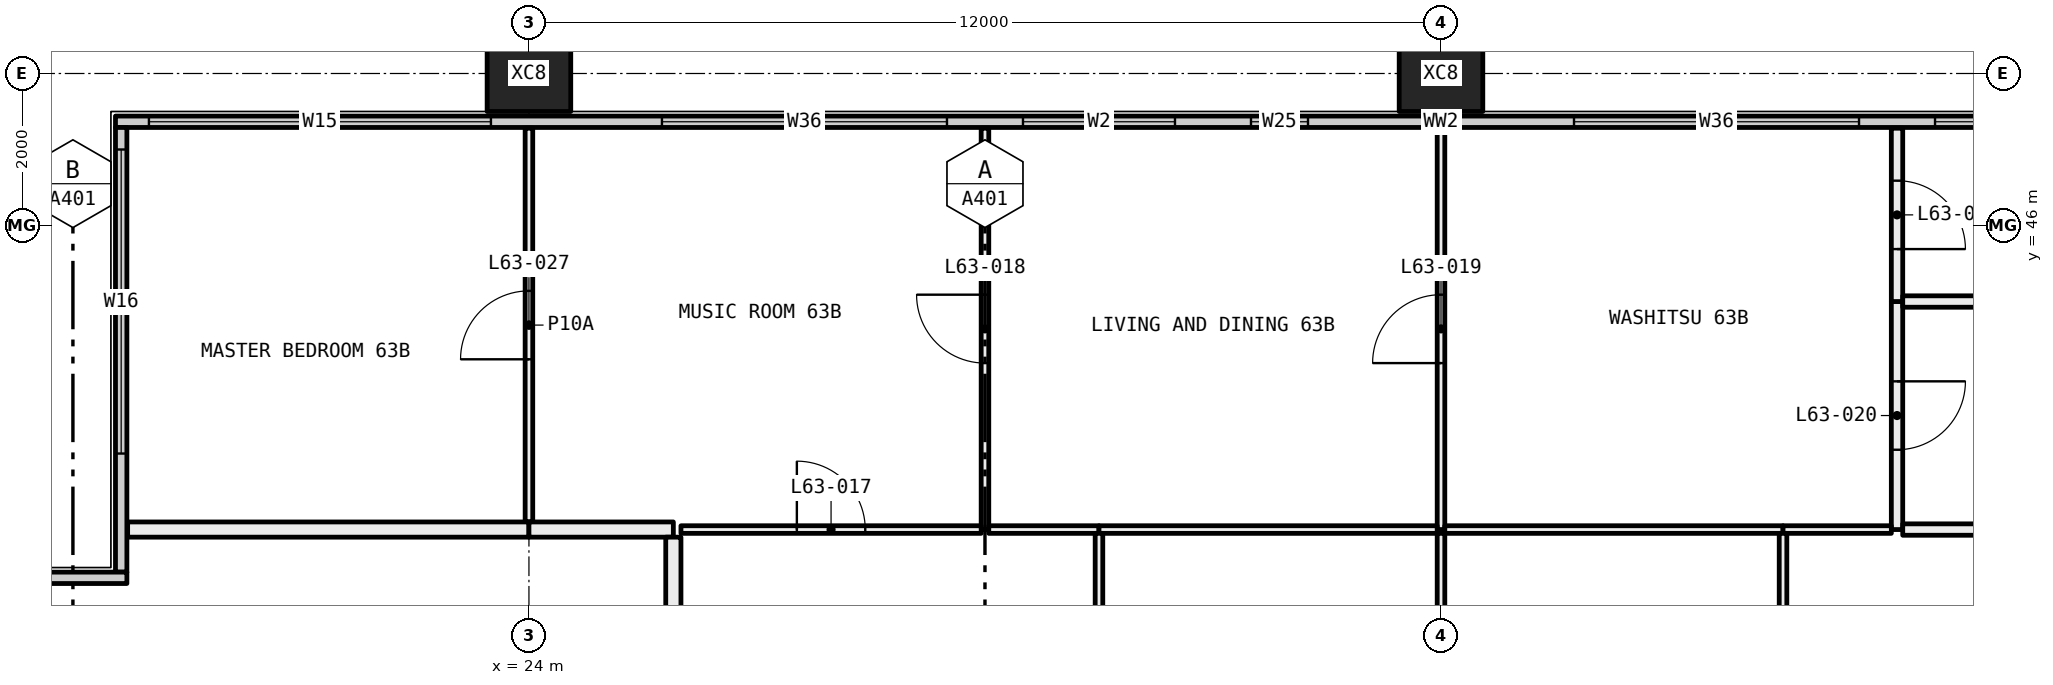
"""IFC4 building model, lengths in metres.
Left out: names, types, materials, properties, quantities, classifications, styles, units other than length and angle.
Written with IfcOpenShell. Run it as: python <this file> out.ifc"""

import sys

from ifc_helpers import new_model, si_unit, direction, frame, frame_2d, origin, origin_2d, place, context, subcontext, project, spatial, rectangle, hollow_rectangle, extrude, element, fill, save


model = new_model("IFC4")
c1 = context("Model", 3, precision=1e-05, world=origin(), true_north=direction((0.0, 1.0)))
c2 = subcontext(c1, "Body", "Model", "MODEL_VIEW")
j1 = project(units=[si_unit("LENGTHUNIT", "METRE"), si_unit("PLANEANGLEUNIT", "RADIAN")], contexts=[c1])
p1 = place(None, origin())
s1 = spatial("IfcSite", under=j1, at=p1, CompositionType="ELEMENT")
p2 = place(p1, origin())
s2 = spatial("IfcBuilding", under=s1, at=p2, CompositionType="ELEMENT")
p3 = place(p2, frame((0.0, 0.0, 235.2)))
s3 = spatial("IfcBuildingStorey", under=s2, at=p3, CompositionType="ELEMENT", Elevation=235.2)
for number, where, z_axis, x_axis in (
    (1, (24.0, 48.0, -0.4), (0.0, 0.0, 1.0), (1.0, 0.0, 0.0)),
    (2, (36.0, 48.0, -0.4), (0.0, 0.0, 1.0), (1.0, 0.0, 0.0)),
):
    element("IfcColumn", number, at=place(p3, frame(where, z_axis=z_axis, x_axis=x_axis)), inside=s3, PredefinedType="COLUMN", context=c2, shape_type="SweptSolid", body=[
        extrude(hollow_rectangle(XDim=1.1, YDim=1.0, WallThickness=0.04, at=origin_2d()), origin(), (0.0, 0.0, 1.0), 3.45),
    ])
p4 = place(p3, frame((18.56, 47.365, 0.0), z_axis=(0.0, 0.0, 1.0), x_axis=(1.0, 0.0, 0.0)))
e3 = element("IfcWall", 3, at=p4, inside=s3, PredefinedType="ELEMENTEDWALL", context=c2, shape_type="SweptSolid", body=[
    extrude(rectangle(XDim=34.88, YDim=0.15, at=frame_2d((17.44, 0.0))), origin(), (0.0, 0.0, 1.0), 3.05),
])
p5 = place(p4, frame((0.44, 0.0, 0.45)))
e4 = element("IfcOpeningElement", 4, at=p5, cuts=e3, PredefinedType="OPENING", context=c2, shape_type="SweptSolid", body=[
    extrude(rectangle(XDim=4.5, YDim=2.55, at=frame_2d((2.25, 1.275))), frame((0.0, 0.085, 0.0), z_axis=(0.0, -1.0, 0.0), x_axis=(1.0, 0.0, 0.0)), (0.0, 0.0, 1.0), 0.17),
])
p6 = place(p4, frame((7.19, 0.0, 0.45)))
e5 = element("IfcOpeningElement", 5, at=p6, cuts=e3, PredefinedType="OPENING", context=c2, shape_type="SweptSolid", body=[
    extrude(rectangle(XDim=3.75, YDim=2.55, at=frame_2d((1.875, 1.275))), frame((0.0, 0.085, 0.0), z_axis=(0.0, -1.0, 0.0), x_axis=(1.0, 0.0, 0.0)), (0.0, 0.0, 1.0), 0.17),
])
p7 = place(p4, frame((11.94, 0.0, 0.45)))
e6 = element("IfcOpeningElement", 6, at=p7, cuts=e3, PredefinedType="OPENING", context=c2, shape_type="SweptSolid", body=[
    extrude(rectangle(XDim=2.0, YDim=2.55, at=frame_2d((1.0, 1.275))), frame((0.0, 0.085, 0.0), z_axis=(0.0, -1.0, 0.0), x_axis=(1.0, 0.0, 0.0)), (0.0, 0.0, 1.0), 0.17),
])
p8 = place(p4, frame((14.94, 0.0, 0.45)))
e7 = element("IfcOpeningElement", 7, at=p8, cuts=e3, PredefinedType="OPENING", context=c2, shape_type="SweptSolid", body=[
    extrude(rectangle(XDim=0.75, YDim=2.55, at=frame_2d((0.375, 1.275))), frame((0.0, 0.085, 0.0), z_axis=(0.0, -1.0, 0.0), x_axis=(1.0, 0.0, 0.0)), (0.0, 0.0, 1.0), 0.17),
])
p9 = place(p4, frame((19.19, 0.0, 0.45)))
e8 = element("IfcOpeningElement", 8, at=p9, cuts=e3, PredefinedType="OPENING", context=c2, shape_type="SweptSolid", body=[
    extrude(rectangle(XDim=3.75, YDim=2.55, at=frame_2d((1.875, 1.275))), frame((0.0, 0.085, 0.0), z_axis=(0.0, -1.0, 0.0), x_axis=(1.0, 0.0, 0.0)), (0.0, 0.0, 1.0), 0.17),
])
p10 = place(p4, frame((23.94, 0.0, 0.45)))
e9 = element("IfcOpeningElement", 9, at=p10, cuts=e3, PredefinedType="OPENING", context=c2, shape_type="SweptSolid", body=[
    extrude(rectangle(XDim=3.75, YDim=2.55, at=frame_2d((1.875, 1.275))), frame((0.0, 0.085, 0.0), z_axis=(0.0, -1.0, 0.0), x_axis=(1.0, 0.0, 0.0)), (0.0, 0.0, 1.0), 0.17),
])
p11 = place(p4, frame((29.94, 0.0, 0.45)))
e10 = element("IfcOpeningElement", 10, at=p11, cuts=e3, PredefinedType="OPENING", context=c2, shape_type="SweptSolid", body=[
    extrude(rectangle(XDim=4.5, YDim=2.55, at=frame_2d((2.25, 1.275))), frame((0.0, 0.085, 0.0), z_axis=(0.0, -1.0, 0.0), x_axis=(1.0, 0.0, 0.0)), (0.0, 0.0, 1.0), 0.17),
])
p12 = place(p3, frame((18.635, 41.44, 0.0), z_axis=(0.0, 0.0, 1.0), x_axis=(0.0, 1.0, 0.0)))
e11 = element("IfcWall", 11, at=p12, inside=s3, PredefinedType="ELEMENTEDWALL", context=c2, shape_type="SweptSolid", body=[
    extrude(rectangle(XDim=5.85, YDim=0.15, at=frame_2d((2.925, 0.0))), origin(), (0.0, 0.0, 1.0), 3.05),
])
p13 = place(p12, frame((1.56, 0.0, 0.45)))
e12 = element("IfcOpeningElement", 12, at=p13, cuts=e11, PredefinedType="OPENING", context=c2, shape_type="SweptSolid", body=[
    extrude(rectangle(XDim=4.0, YDim=2.55, at=frame_2d((2.0, 1.275))), frame((0.0, 0.085, 0.0), z_axis=(0.0, -1.0, 0.0), x_axis=(1.0, 0.0, 0.0)), (0.0, 0.0, 1.0), 0.17),
])
p14 = place(p3, frame((12.56, 41.365, 0.0), z_axis=(0.0, 0.0, 1.0), x_axis=(1.0, 0.0, 0.0)))
e13 = element("IfcWall", 13, at=p14, inside=s3, PredefinedType="ELEMENTEDWALL", context=c2, shape_type="SweptSolid", body=[
    extrude(rectangle(XDim=6.15, YDim=0.15, at=frame_2d((3.075, 0.0))), origin(), (0.0, 0.0, 1.0), 3.05),
])
p15 = place(p14, frame((0.44, 0.0, 0.45)))
e14 = element("IfcOpeningElement", 14, at=p15, cuts=e13, PredefinedType="OPENING", context=c2, shape_type="SweptSolid", body=[
    extrude(rectangle(XDim=4.0, YDim=2.55, at=frame_2d((2.0, 1.275))), frame((0.0, 0.085, 0.0), z_axis=(0.0, -1.0, 0.0), x_axis=(1.0, 0.0, 0.0)), (0.0, 0.0, 1.0), 0.17),
])
p16 = place(p3, frame((24.0, 42.1, 0.0), z_axis=(0.0, 0.0, 1.0), x_axis=(0.0, 1.0, 0.0)))
e15 = element("IfcWall", 15, at=p16, inside=s3, PredefinedType="PARTITIONING", context=c2, shape_type="SweptSolid", body=[
    extrude(rectangle(XDim=5.18, YDim=0.1, at=frame_2d((2.59, 0.0))), origin(), (0.0, 0.0, 1.0), 3.05),
])
p17 = place(p16, frame((2.14, 0.0, 0.0)))
e16 = element("IfcOpeningElement", 16, at=p17, cuts=e15, PredefinedType="OPENING", context=c2, shape_type="SweptSolid", body=[
    extrude(rectangle(XDim=0.9, YDim=2.1, at=frame_2d((0.45, 1.05))), frame((0.0, 0.06, 0.0), z_axis=(0.0, -1.0, 0.0), x_axis=(1.0, 0.0, 0.0)), (0.0, 0.0, 1.0), 0.12),
])
p18 = place(p3, frame((18.72, 42.0, 0.0), z_axis=(0.0, 0.0, 1.0), x_axis=(1.0, 0.0, 0.0)))
e17 = element("IfcWall", 17, at=p18, inside=s3, PredefinedType="PARTITIONING", context=c2, shape_type="SweptSolid", body=[
    extrude(rectangle(XDim=5.28, YDim=0.2, at=frame_2d((2.64, 0.0))), origin(), (0.0, 0.0, 1.0), 3.05),
])
p19 = place(p3, frame((30.0, 42.0, 0.0), z_axis=(0.0, 0.0, 1.0), x_axis=(0.0, 1.0, 0.0)))
e18 = element("IfcWall", 18, at=p19, inside=s3, PredefinedType="PARTITIONING", context=c2, shape_type="SweptSolid", body=[
    extrude(rectangle(XDim=5.28, YDim=0.1, at=frame_2d((2.64, 0.0))), origin(), (0.0, 0.0, 1.0), 3.05),
])
p20 = place(p19, frame((2.19, 0.0, 0.0)))
e19 = element("IfcOpeningElement", 19, at=p20, cuts=e18, PredefinedType="OPENING", context=c2, shape_type="SweptSolid", body=[
    extrude(rectangle(XDim=0.9, YDim=2.1, at=frame_2d((0.45, 1.05))), frame((0.0, 0.06, 0.0), z_axis=(0.0, -1.0, 0.0), x_axis=(1.0, 0.0, 0.0)), (0.0, 0.0, 1.0), 0.12),
])
p21 = place(p3, frame((26.0, 42.0, 0.0), z_axis=(0.0, 0.0, 1.0), x_axis=(1.0, 0.0, 0.0)))
e20 = element("IfcWall", 20, at=p21, inside=s3, PredefinedType="PARTITIONING", context=c2, shape_type="SweptSolid", body=[
    extrude(rectangle(XDim=3.95, YDim=0.1, at=frame_2d((1.975, 0.0))), origin(), (0.0, 0.0, 1.0), 3.05),
])
p22 = place(p21, frame((1.525, 0.0, 0.0)))
e21 = element("IfcOpeningElement", 21, at=p22, cuts=e20, PredefinedType="OPENING", context=c2, shape_type="SweptSolid", body=[
    extrude(rectangle(XDim=0.9, YDim=2.1, at=frame_2d((0.45, 1.05))), frame((0.0, 0.06, 0.0), z_axis=(0.0, -1.0, 0.0), x_axis=(1.0, 0.0, 0.0)), (0.0, 0.0, 1.0), 0.12),
])
p23 = place(p3, frame((24.0, 42.0, 0.0), z_axis=(0.0, 0.0, 1.0), x_axis=(1.0, 0.0, 0.0)))
e22 = element("IfcWall", 22, at=p23, inside=s3, PredefinedType="PARTITIONING", context=c2, shape_type="SweptSolid", body=[
    extrude(rectangle(XDim=1.9, YDim=0.2, at=frame_2d((0.95, 0.0))), origin(), (0.0, 0.0, 1.0), 3.05),
])
p24 = place(p3, frame((36.0, 42.0, 0.0), z_axis=(0.0, 0.0, 1.0), x_axis=(0.0, 1.0, 0.0)))
e23 = element("IfcWall", 23, at=p24, inside=s3, PredefinedType="PARTITIONING", context=c2, shape_type="SweptSolid", body=[
    extrude(rectangle(XDim=5.28, YDim=0.1, at=frame_2d((2.64, 0.0))), origin(), (0.0, 0.0, 1.0), 2.45),
])
p25 = place(p24, frame((2.19, 0.0, 0.0)))
e24 = element("IfcOpeningElement", 24, at=p25, cuts=e23, PredefinedType="OPENING", context=c2, shape_type="SweptSolid", body=[
    extrude(rectangle(XDim=0.9, YDim=2.1, at=frame_2d((0.45, 1.05))), frame((0.0, 0.06, 0.0), z_axis=(0.0, -1.0, 0.0), x_axis=(1.0, 0.0, 0.0)), (0.0, 0.0, 1.0), 0.12),
])
p26 = place(p3, frame((30.05, 42.0, 0.0), z_axis=(0.0, 0.0, 1.0), x_axis=(1.0, 0.0, 0.0)))
e25 = element("IfcWall", 25, at=p26, inside=s3, PredefinedType="PARTITIONING", context=c2, shape_type="SweptSolid", body=[
    extrude(rectangle(XDim=1.45, YDim=0.1, at=frame_2d((0.725, 0.0))), origin(), (0.0, 0.0, 1.0), 3.05),
])
p27 = place(p3, frame((31.5, 42.0, 0.0), z_axis=(0.0, 0.0, 1.0), x_axis=(1.0, 0.0, 0.0)))
e26 = element("IfcWall", 26, at=p27, inside=s3, PredefinedType="PARTITIONING", context=c2, shape_type="SweptSolid", body=[
    extrude(rectangle(XDim=4.45, YDim=0.1, at=frame_2d((2.225, 0.0))), origin(), (0.0, 0.0, 1.0), 2.45),
])
p28 = place(p3, frame((42.0, 42.0, 0.0), z_axis=(0.0, 0.0, 1.0), x_axis=(0.0, 1.0, 0.0)))
e27 = element("IfcWall", 27, at=p28, inside=s3, PredefinedType="PARTITIONING", context=c2, shape_type="SweptSolid", body=[
    extrude(rectangle(XDim=3.0, YDim=0.15, at=frame_2d((1.5, 0.0))), origin(), (0.0, 0.0, 1.0), 3.05),
])
p29 = place(p28, frame((1.05, 0.0, 0.0)))
e28 = element("IfcOpeningElement", 28, at=p29, cuts=e27, PredefinedType="OPENING", context=c2, shape_type="SweptSolid", body=[
    extrude(rectangle(XDim=0.9, YDim=2.1, at=frame_2d((0.45, 1.05))), frame((0.0, 0.085, 0.0), z_axis=(0.0, -1.0, 0.0), x_axis=(1.0, 0.0, 0.0)), (0.0, 0.0, 1.0), 0.17),
])
p30 = place(p3, frame((42.0, 45.0, 0.0), z_axis=(0.0, 0.0, 1.0), x_axis=(0.0, 1.0, 0.0)))
e29 = element("IfcWall", 29, at=p30, inside=s3, PredefinedType="PARTITIONING", context=c2, shape_type="SweptSolid", body=[
    extrude(rectangle(XDim=2.28, YDim=0.15, at=frame_2d((1.14, 0.0))), origin(), (0.0, 0.0, 1.0), 3.05),
])
p31 = place(p30, frame((0.69, 0.0, 0.0)))
e30 = element("IfcOpeningElement", 30, at=p31, cuts=e29, PredefinedType="OPENING", context=c2, shape_type="SweptSolid", body=[
    extrude(rectangle(XDim=0.9, YDim=2.1, at=frame_2d((0.45, 1.05))), frame((0.0, 0.085, 0.0), z_axis=(0.0, -1.0, 0.0), x_axis=(1.0, 0.0, 0.0)), (0.0, 0.0, 1.0), 0.17),
])
p32 = place(p3, frame((36.05, 42.0, 0.0), z_axis=(0.0, 0.0, 1.0), x_axis=(1.0, 0.0, 0.0)))
e31 = element("IfcWall", 31, at=p32, inside=s3, PredefinedType="PARTITIONING", context=c2, shape_type="SweptSolid", body=[
    extrude(rectangle(XDim=4.45, YDim=0.1, at=frame_2d((2.225, 0.0))), origin(), (0.0, 0.0, 1.0), 2.45),
])
p33 = place(p3, frame((40.5, 42.0, 0.0), z_axis=(0.0, 0.0, 1.0), x_axis=(1.0, 0.0, 0.0)))
e32 = element("IfcWall", 32, at=p33, inside=s3, PredefinedType="PARTITIONING", context=c2, shape_type="SweptSolid", body=[
    extrude(rectangle(XDim=1.425, YDim=0.1, at=frame_2d((0.712, 0.0))), origin(), (0.0, 0.0, 1.0), 3.05),
])
p34 = place(p3, frame((47.9, 45.0, 0.0), z_axis=(0.0, 0.0, 1.0), x_axis=(-1.0, 0.0, 0.0)))
e33 = element("IfcWall", 33, at=p34, inside=s3, PredefinedType="PARTITIONING", context=c2, shape_type="SweptSolid", body=[
    extrude(rectangle(XDim=5.825, YDim=0.15, at=frame_2d((2.913, 0.0))), origin(), (0.0, 0.0, 1.0), 3.05),
])
p35 = place(p3, frame((42.075, 42.0, 0.0), z_axis=(0.0, 0.0, 1.0), x_axis=(1.0, 0.0, 0.0)))
e34 = element("IfcWall", 34, at=p35, inside=s3, PredefinedType="PARTITIONING", context=c2, shape_type="SweptSolid", body=[
    extrude(rectangle(XDim=3.925, YDim=0.15, at=frame_2d((1.962, 0.0))), origin(), (0.0, 0.0, 1.0), 3.05),
])
p36 = place(p3, frame((31.5, 36.1, 0.0), z_axis=(0.0, 0.0, 1.0), x_axis=(0.0, 1.0, 0.0)))
e35 = element("IfcWall", 35, at=p36, inside=s3, PredefinedType="PARTITIONING", context=c2, shape_type="SweptSolid", body=[
    extrude(rectangle(XDim=5.85, YDim=0.1, at=frame_2d((2.925, 0.0))), origin(), (0.0, 0.0, 1.0), 3.05),
])
p37 = place(p36, frame((2.475, 0.0, 0.0)))
e36 = element("IfcOpeningElement", 36, at=p37, cuts=e35, PredefinedType="OPENING", context=c2, shape_type="SweptSolid", body=[
    extrude(rectangle(XDim=0.9, YDim=2.1, at=frame_2d((0.45, 1.05))), frame((0.0, 0.06, 0.0), z_axis=(0.0, -1.0, 0.0), x_axis=(1.0, 0.0, 0.0)), (0.0, 0.0, 1.0), 0.12),
])
p38 = place(p3, frame((25.9, 41.9, 0.0), z_axis=(0.0, 0.0, 1.0), x_axis=(0.0, -1.0, 0.0)))
e37 = element("IfcWall", 37, at=p38, inside=s3, PredefinedType="PARTITIONING", context=c2, shape_type="SweptSolid", body=[
    extrude(rectangle(XDim=6.2, YDim=0.2, at=frame_2d((3.1, 0.0))), origin(), (0.0, 0.0, 1.0), 2.45),
])
p39 = place(p3, frame((36.0, 36.55, 0.0), z_axis=(0.0, 0.0, 1.0), x_axis=(0.0, 1.0, 0.0)))
e38 = element("IfcWall", 38, at=p39, inside=s3, PredefinedType="PARTITIONING", context=c2, shape_type="SweptSolid", body=[
    extrude(rectangle(XDim=5.4, YDim=0.1, at=frame_2d((2.7, 0.0))), origin(), (0.0, 0.0, 1.0), 2.45),
])
p40 = place(p39, frame((2.25, 0.0, 0.0)))
e39 = element("IfcOpeningElement", 39, at=p40, cuts=e38, PredefinedType="OPENING", context=c2, shape_type="SweptSolid", body=[
    extrude(rectangle(XDim=0.9, YDim=2.1, at=frame_2d((0.45, 1.05))), frame((0.0, 0.06, 0.0), z_axis=(0.0, -1.0, 0.0), x_axis=(1.0, 0.0, 0.0)), (0.0, 0.0, 1.0), 0.12),
])
p41 = place(p3, frame((40.5, 36.1, 0.0), z_axis=(0.0, 0.0, 1.0), x_axis=(0.0, 1.0, 0.0)))
e40 = element("IfcWall", 40, at=p41, inside=s3, PredefinedType="PARTITIONING", context=c2, shape_type="SweptSolid", body=[
    extrude(rectangle(XDim=5.85, YDim=0.1, at=frame_2d((2.925, 0.0))), origin(), (0.0, 0.0, 1.0), 3.05),
])
p42 = place(p41, frame((2.475, 0.0, 0.0)))
e41 = element("IfcOpeningElement", 41, at=p42, cuts=e40, PredefinedType="OPENING", context=c2, shape_type="SweptSolid", body=[
    extrude(rectangle(XDim=0.9, YDim=2.1, at=frame_2d((0.45, 1.05))), frame((0.0, 0.06, 0.0), z_axis=(0.0, -1.0, 0.0), x_axis=(1.0, 0.0, 0.0)), (0.0, 0.0, 1.0), 0.12),
])
p43 = place(p5, origin())
e42 = element("IfcWindow", 42, at=p43, inside=s3, PartitioningType="SINGLE_PANEL", PredefinedType="WINDOW", context=c2, shape_type="SweptSolid", body=[
    extrude(rectangle(XDim=4.5, YDim=2.55, at=frame_2d((2.25, 1.275))), frame((0.0, 0.03, 0.0), z_axis=(0.0, -1.0, 0.0), x_axis=(1.0, 0.0, 0.0)), (0.0, 0.0, 1.0), 0.06),
])
fill(e4, e42)
p44 = place(p6, origin())
e43 = element("IfcWindow", 43, at=p44, inside=s3, PartitioningType="SINGLE_PANEL", PredefinedType="WINDOW", context=c2, shape_type="SweptSolid", body=[
    extrude(rectangle(XDim=3.75, YDim=2.55, at=frame_2d((1.875, 1.275))), frame((0.0, 0.03, 0.0), z_axis=(0.0, -1.0, 0.0), x_axis=(1.0, 0.0, 0.0)), (0.0, 0.0, 1.0), 0.06),
])
fill(e5, e43)
p45 = place(p7, origin())
e44 = element("IfcWindow", 44, at=p45, inside=s3, PartitioningType="SINGLE_PANEL", PredefinedType="WINDOW", context=c2, shape_type="SweptSolid", body=[
    extrude(rectangle(XDim=2.0, YDim=2.55, at=frame_2d((1.0, 1.275))), frame((0.0, 0.03, 0.0), z_axis=(0.0, -1.0, 0.0), x_axis=(1.0, 0.0, 0.0)), (0.0, 0.0, 1.0), 0.06),
])
fill(e6, e44)
p46 = place(p8, origin())
e45 = element("IfcWindow", 45, at=p46, inside=s3, PartitioningType="SINGLE_PANEL", PredefinedType="WINDOW", context=c2, shape_type="SweptSolid", body=[
    extrude(rectangle(XDim=0.75, YDim=2.55, at=frame_2d((0.375, 1.275))), frame((0.0, 0.03, 0.0), z_axis=(0.0, -1.0, 0.0), x_axis=(1.0, 0.0, 0.0)), (0.0, 0.0, 1.0), 0.06),
])
fill(e7, e45)
p47 = place(p9, origin())
e46 = element("IfcWindow", 46, at=p47, inside=s3, PartitioningType="SINGLE_PANEL", PredefinedType="WINDOW", context=c2, shape_type="SweptSolid", body=[
    extrude(rectangle(XDim=3.75, YDim=2.55, at=frame_2d((1.875, 1.275))), frame((0.0, 0.03, 0.0), z_axis=(0.0, -1.0, 0.0), x_axis=(1.0, 0.0, 0.0)), (0.0, 0.0, 1.0), 0.06),
])
fill(e8, e46)
p48 = place(p10, origin())
e47 = element("IfcWindow", 47, at=p48, inside=s3, PartitioningType="SINGLE_PANEL", PredefinedType="WINDOW", context=c2, shape_type="SweptSolid", body=[
    extrude(rectangle(XDim=3.75, YDim=2.55, at=frame_2d((1.875, 1.275))), frame((0.0, 0.03, 0.0), z_axis=(0.0, -1.0, 0.0), x_axis=(1.0, 0.0, 0.0)), (0.0, 0.0, 1.0), 0.06),
])
fill(e9, e47)
p49 = place(p13, origin())
e48 = element("IfcWindow", 48, at=p49, inside=s3, PartitioningType="SINGLE_PANEL", PredefinedType="WINDOW", context=c2, shape_type="SweptSolid", body=[
    extrude(rectangle(XDim=4.0, YDim=2.55, at=frame_2d((2.0, 1.275))), frame((0.0, 0.03, 0.0), z_axis=(0.0, -1.0, 0.0), x_axis=(1.0, 0.0, 0.0)), (0.0, 0.0, 1.0), 0.06),
])
fill(e12, e48)
p50 = place(p22, origin())
e49 = element("IfcDoor", 49, at=p50, inside=s3, OperationType="SINGLE_SWING_RIGHT", PredefinedType="DOOR", context=c2, shape_type="SweptSolid", body=[
    extrude(rectangle(XDim=0.9, YDim=2.1, at=frame_2d((0.45, 1.05))), frame((0.0, 0.025, 0.0), z_axis=(0.0, -1.0, 0.0), x_axis=(1.0, 0.0, 0.0)), (0.0, 0.0, 1.0), 0.05),
])
fill(e21, e49)
p51 = place(p20, origin())
e50 = element("IfcDoor", 50, at=p51, inside=s3, OperationType="SINGLE_SWING_LEFT", PredefinedType="DOOR", context=c2, shape_type="SweptSolid", body=[
    extrude(rectangle(XDim=0.9, YDim=2.1, at=frame_2d((0.45, 1.05))), frame((0.0, 0.025, 0.0), z_axis=(0.0, -1.0, 0.0), x_axis=(1.0, 0.0, 0.0)), (0.0, 0.0, 1.0), 0.05),
])
fill(e19, e50)
p52 = place(p25, origin())
e51 = element("IfcDoor", 51, at=p52, inside=s3, OperationType="SINGLE_SWING_RIGHT", PredefinedType="DOOR", context=c2, shape_type="SweptSolid", body=[
    extrude(rectangle(XDim=0.9, YDim=2.1, at=frame_2d((0.45, 1.05))), frame((0.0, 0.025, 0.0), z_axis=(0.0, -1.0, 0.0), x_axis=(1.0, 0.0, 0.0)), (0.0, 0.0, 1.0), 0.05),
])
fill(e24, e51)
p53 = place(p29, frame((0.9, 0.0, 0.0), x_axis=(-1.0, 0.0, 0.0)))
e52 = element("IfcDoor", 52, at=p53, inside=s3, OperationType="SINGLE_SWING_RIGHT", PredefinedType="DOOR", context=c2, shape_type="SweptSolid", body=[
    extrude(rectangle(XDim=0.9, YDim=2.1, at=frame_2d((0.45, 1.05))), frame((0.0, 0.025, 0.0), z_axis=(0.0, -1.0, 0.0), x_axis=(1.0, 0.0, 0.0)), (0.0, 0.0, 1.0), 0.05),
])
fill(e28, e52)
p54 = place(p31, frame((0.9, 0.0, 0.0), x_axis=(-1.0, 0.0, 0.0)))
e53 = element("IfcDoor", 53, at=p54, inside=s3, OperationType="SINGLE_SWING_LEFT", PredefinedType="DOOR", context=c2, shape_type="SweptSolid", body=[
    extrude(rectangle(XDim=0.9, YDim=2.1, at=frame_2d((0.45, 1.05))), frame((0.0, 0.025, 0.0), z_axis=(0.0, -1.0, 0.0), x_axis=(1.0, 0.0, 0.0)), (0.0, 0.0, 1.0), 0.05),
])
fill(e30, e53)
p55 = place(p17, origin())
e54 = element("IfcDoor", 54, at=p55, inside=s3, OperationType="SINGLE_SWING_RIGHT", PredefinedType="DOOR", context=c2, shape_type="SweptSolid", body=[
    extrude(rectangle(XDim=0.9, YDim=2.1, at=frame_2d((0.45, 1.05))), frame((0.0, 0.025, 0.0), z_axis=(0.0, -1.0, 0.0), x_axis=(1.0, 0.0, 0.0)), (0.0, 0.0, 1.0), 0.05),
])
fill(e16, e54)
save(model, sys.argv[1])
